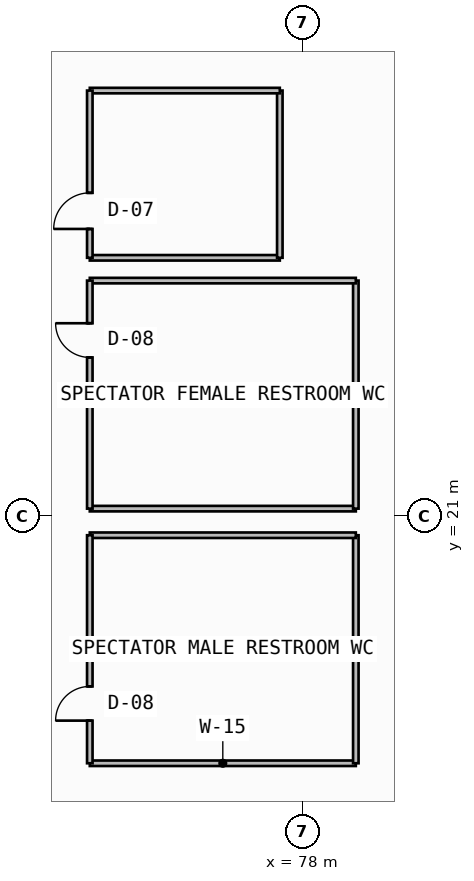
"""IFC4 building model, lengths in metres.
Left out: names, types, materials, properties, quantities, classifications, styles, units other than length and angle.
Written with IfcOpenShell. Run it as: python <this file> out.ifc"""

import sys

from ifc_helpers import new_model, si_unit, direction, frame, frame_2d, origin, place, context, subcontext, project, spatial, rectangle, extrude, element, fill, save


model = new_model("IFC4")
c1 = context("Model", 3, precision=1e-05, world=origin(), true_north=direction((0.0, 1.0)))
c2 = subcontext(c1, "Body", "Model", "MODEL_VIEW")
j1 = project(units=[si_unit("LENGTHUNIT", "METRE"), si_unit("PLANEANGLEUNIT", "RADIAN")], contexts=[c1])
p1 = place(None, origin())
s1 = spatial("IfcSite", under=j1, at=p1, CompositionType="ELEMENT")
p2 = place(p1, origin())
s2 = spatial("IfcBuilding", under=s1, at=p2, CompositionType="ELEMENT")
p3 = place(p2, frame((0.0, 0.0, 4.5)))
s3 = spatial("IfcBuildingStorey", under=s2, at=p3, CompositionType="ELEMENT", Elevation=4.5)
p4 = place(p3, frame((72.4, 14.5, 0.0), z_axis=(0.0, 0.0, 1.0), x_axis=(1.0, 0.0, 0.0)))
e1 = element("IfcWall", 1, at=p4, inside=s3, PredefinedType="PARTITIONING", context=c2, shape_type="SweptSolid", body=[
    extrude(rectangle(XDim=7.0, YDim=0.145, at=frame_2d((3.5, 0.0))), origin(), (0.0, 0.0, 1.0), 3.665),
])
p5 = place(p3, frame((79.4, 14.5, 0.0), z_axis=(0.0, 0.0, 1.0), x_axis=(0.0, 1.0, 0.0)))
e2 = element("IfcWall", 2, at=p5, inside=s3, PredefinedType="PARTITIONING", context=c2, shape_type="SweptSolid", body=[
    extrude(rectangle(XDim=6.0, YDim=0.145, at=frame_2d((3.0, 0.0))), origin(), (0.0, 0.0, 1.0), 3.465),
])
p6 = place(p3, frame((79.4, 20.5, 0.0), z_axis=(0.0, 0.0, 1.0), x_axis=(-1.0, 0.0, 0.0)))
e3 = element("IfcWall", 3, at=p6, inside=s3, PredefinedType="PARTITIONING", context=c2, shape_type="SweptSolid", body=[
    extrude(rectangle(XDim=7.0, YDim=0.145, at=frame_2d((3.5, 0.0))), origin(), (0.0, 0.0, 1.0), 3.465),
])
p7 = place(p3, frame((72.4, 20.5, 0.0), z_axis=(0.0, 0.0, 1.0), x_axis=(0.0, -1.0, 0.0)))
e4 = element("IfcWall", 4, at=p7, inside=s3, PredefinedType="PARTITIONING", context=c2, shape_type="SweptSolid", body=[
    extrude(rectangle(XDim=6.0, YDim=0.145, at=frame_2d((3.0, 0.0))), origin(), (0.0, 0.0, 1.0), 3.465),
])
p8 = place(p7, frame((3.978, 0.0, 0.0)))
e5 = element("IfcOpeningElement", 5, at=p8, cuts=e4, PredefinedType="OPENING", context=c2, shape_type="SweptSolid", body=[
    extrude(rectangle(XDim=0.9, YDim=2.1, at=frame_2d((0.45, 1.05))), frame((0.0, 0.083, 0.0), z_axis=(0.0, -1.0, 0.0), x_axis=(1.0, 0.0, 0.0)), (0.0, 0.0, 1.0), 0.165),
])
p9 = place(p3, frame((72.4, 21.2, 0.0), z_axis=(0.0, 0.0, 1.0), x_axis=(1.0, 0.0, 0.0)))
e6 = element("IfcWall", 6, at=p9, inside=s3, PredefinedType="PARTITIONING", context=c2, shape_type="SweptSolid", body=[
    extrude(rectangle(XDim=7.0, YDim=0.145, at=frame_2d((3.5, 0.0))), origin(), (0.0, 0.0, 1.0), 4.18),
])
p10 = place(p3, frame((79.4, 21.2, 0.0), z_axis=(0.0, 0.0, 1.0), x_axis=(0.0, 1.0, 0.0)))
e7 = element("IfcWall", 7, at=p10, inside=s3, PredefinedType="PARTITIONING", context=c2, shape_type="SweptSolid", body=[
    extrude(rectangle(XDim=6.0, YDim=0.145, at=frame_2d((3.0, 0.0))), origin(), (0.0, 0.0, 1.0), 4.18),
])
p11 = place(p3, frame((79.4, 27.2, 0.0), z_axis=(0.0, 0.0, 1.0), x_axis=(-1.0, 0.0, 0.0)))
e8 = element("IfcWall", 8, at=p11, inside=s3, PredefinedType="PARTITIONING", context=c2, shape_type="SweptSolid", body=[
    extrude(rectangle(XDim=7.0, YDim=0.145, at=frame_2d((3.5, 0.0))), origin(), (0.0, 0.0, 1.0), 4.18),
])
p12 = place(p3, frame((72.4, 27.2, 0.0), z_axis=(0.0, 0.0, 1.0), x_axis=(0.0, -1.0, 0.0)))
e9 = element("IfcWall", 9, at=p12, inside=s3, PredefinedType="PARTITIONING", context=c2, shape_type="SweptSolid", body=[
    extrude(rectangle(XDim=6.0, YDim=0.145, at=frame_2d((3.0, 0.0))), origin(), (0.0, 0.0, 1.0), 4.18),
])
p13 = place(p12, frame((1.122, 0.0, 0.0)))
e10 = element("IfcOpeningElement", 10, at=p13, cuts=e9, PredefinedType="OPENING", context=c2, shape_type="SweptSolid", body=[
    extrude(rectangle(XDim=0.9, YDim=2.1, at=frame_2d((0.45, 1.05))), frame((0.0, 0.083, 0.0), z_axis=(0.0, -1.0, 0.0), x_axis=(1.0, 0.0, 0.0)), (0.0, 0.0, 1.0), 0.165),
])
p14 = place(p3, frame((72.4, 27.8, 0.0), z_axis=(0.0, 0.0, 1.0), x_axis=(1.0, 0.0, 0.0)))
e11 = element("IfcWall", 11, at=p14, inside=s3, PredefinedType="PARTITIONING", context=c2, shape_type="SweptSolid", body=[
    extrude(rectangle(XDim=5.0, YDim=0.145, at=frame_2d((2.5, 0.0))), origin(), (0.0, 0.0, 1.0), 4.18),
])
p15 = place(p3, frame((77.4, 27.8, 0.0), z_axis=(0.0, 0.0, 1.0), x_axis=(0.0, 1.0, 0.0)))
e12 = element("IfcWall", 12, at=p15, inside=s3, PredefinedType="PARTITIONING", context=c2, shape_type="SweptSolid", body=[
    extrude(rectangle(XDim=4.4, YDim=0.145, at=frame_2d((2.2, 0.0))), origin(), (0.0, 0.0, 1.0), 4.18),
])
p16 = place(p3, frame((77.4, 32.2, 0.0), z_axis=(0.0, 0.0, 1.0), x_axis=(-1.0, 0.0, 0.0)))
e13 = element("IfcWall", 13, at=p16, inside=s3, PredefinedType="PARTITIONING", context=c2, shape_type="SweptSolid", body=[
    extrude(rectangle(XDim=5.0, YDim=0.145, at=frame_2d((2.5, 0.0))), origin(), (0.0, 0.0, 1.0), 4.18),
])
p17 = place(p3, frame((72.4, 32.2, 0.0), z_axis=(0.0, 0.0, 1.0), x_axis=(0.0, -1.0, 0.0)))
e14 = element("IfcWall", 14, at=p17, inside=s3, PredefinedType="PARTITIONING", context=c2, shape_type="SweptSolid", body=[
    extrude(rectangle(XDim=4.4, YDim=0.145, at=frame_2d((2.2, 0.0))), origin(), (0.0, 0.0, 1.0), 4.18),
])
p18 = place(p17, frame((2.691, 0.0, 0.0)))
e15 = element("IfcOpeningElement", 15, at=p18, cuts=e14, PredefinedType="OPENING", context=c2, shape_type="SweptSolid", body=[
    extrude(rectangle(XDim=0.95, YDim=2.15, at=frame_2d((0.475, 1.075))), frame((0.0, 0.083, 0.0), z_axis=(0.0, -1.0, 0.0), x_axis=(1.0, 0.0, 0.0)), (0.0, 0.0, 1.0), 0.165),
])
p19 = place(p8, frame((0.9, 0.0, 0.0), z_axis=(0.0, 0.0, 1.0), x_axis=(-1.0, 0.0, 0.0)))
e16 = element("IfcDoor", 16, at=p19, inside=s3, OperationType="SINGLE_SWING_LEFT", PredefinedType="DOOR", context=c2, shape_type="SweptSolid", body=[
    extrude(rectangle(XDim=0.9, YDim=2.1, at=frame_2d((0.45, 1.05))), frame((0.0, 0.025, 0.0), z_axis=(0.0, -1.0, 0.0), x_axis=(1.0, 0.0, 0.0)), (0.0, 0.0, 1.0), 0.05),
])
fill(e5, e16)
p20 = place(p13, frame((0.9, 0.0, 0.0), z_axis=(0.0, 0.0, 1.0), x_axis=(-1.0, 0.0, 0.0)))
e17 = element("IfcDoor", 17, at=p20, inside=s3, OperationType="SINGLE_SWING_RIGHT", PredefinedType="DOOR", context=c2, shape_type="SweptSolid", body=[
    extrude(rectangle(XDim=0.9, YDim=2.1, at=frame_2d((0.45, 1.05))), frame((0.0, 0.025, 0.0), z_axis=(0.0, -1.0, 0.0), x_axis=(1.0, 0.0, 0.0)), (0.0, 0.0, 1.0), 0.05),
])
fill(e10, e17)
p21 = place(p18, frame((0.95, 0.0, 0.0), z_axis=(0.0, 0.0, 1.0), x_axis=(-1.0, 0.0, 0.0)))
e18 = element("IfcDoor", 18, at=p21, inside=s3, OperationType="SINGLE_SWING_LEFT", PredefinedType="DOOR", context=c2, shape_type="SweptSolid", body=[
    extrude(rectangle(XDim=0.95, YDim=2.15, at=frame_2d((0.475, 1.075))), frame((0.0, 0.025, 0.0), z_axis=(0.0, -1.0, 0.0), x_axis=(1.0, 0.0, 0.0)), (0.0, 0.0, 1.0), 0.05),
])
fill(e15, e18)
save(model, sys.argv[1])
